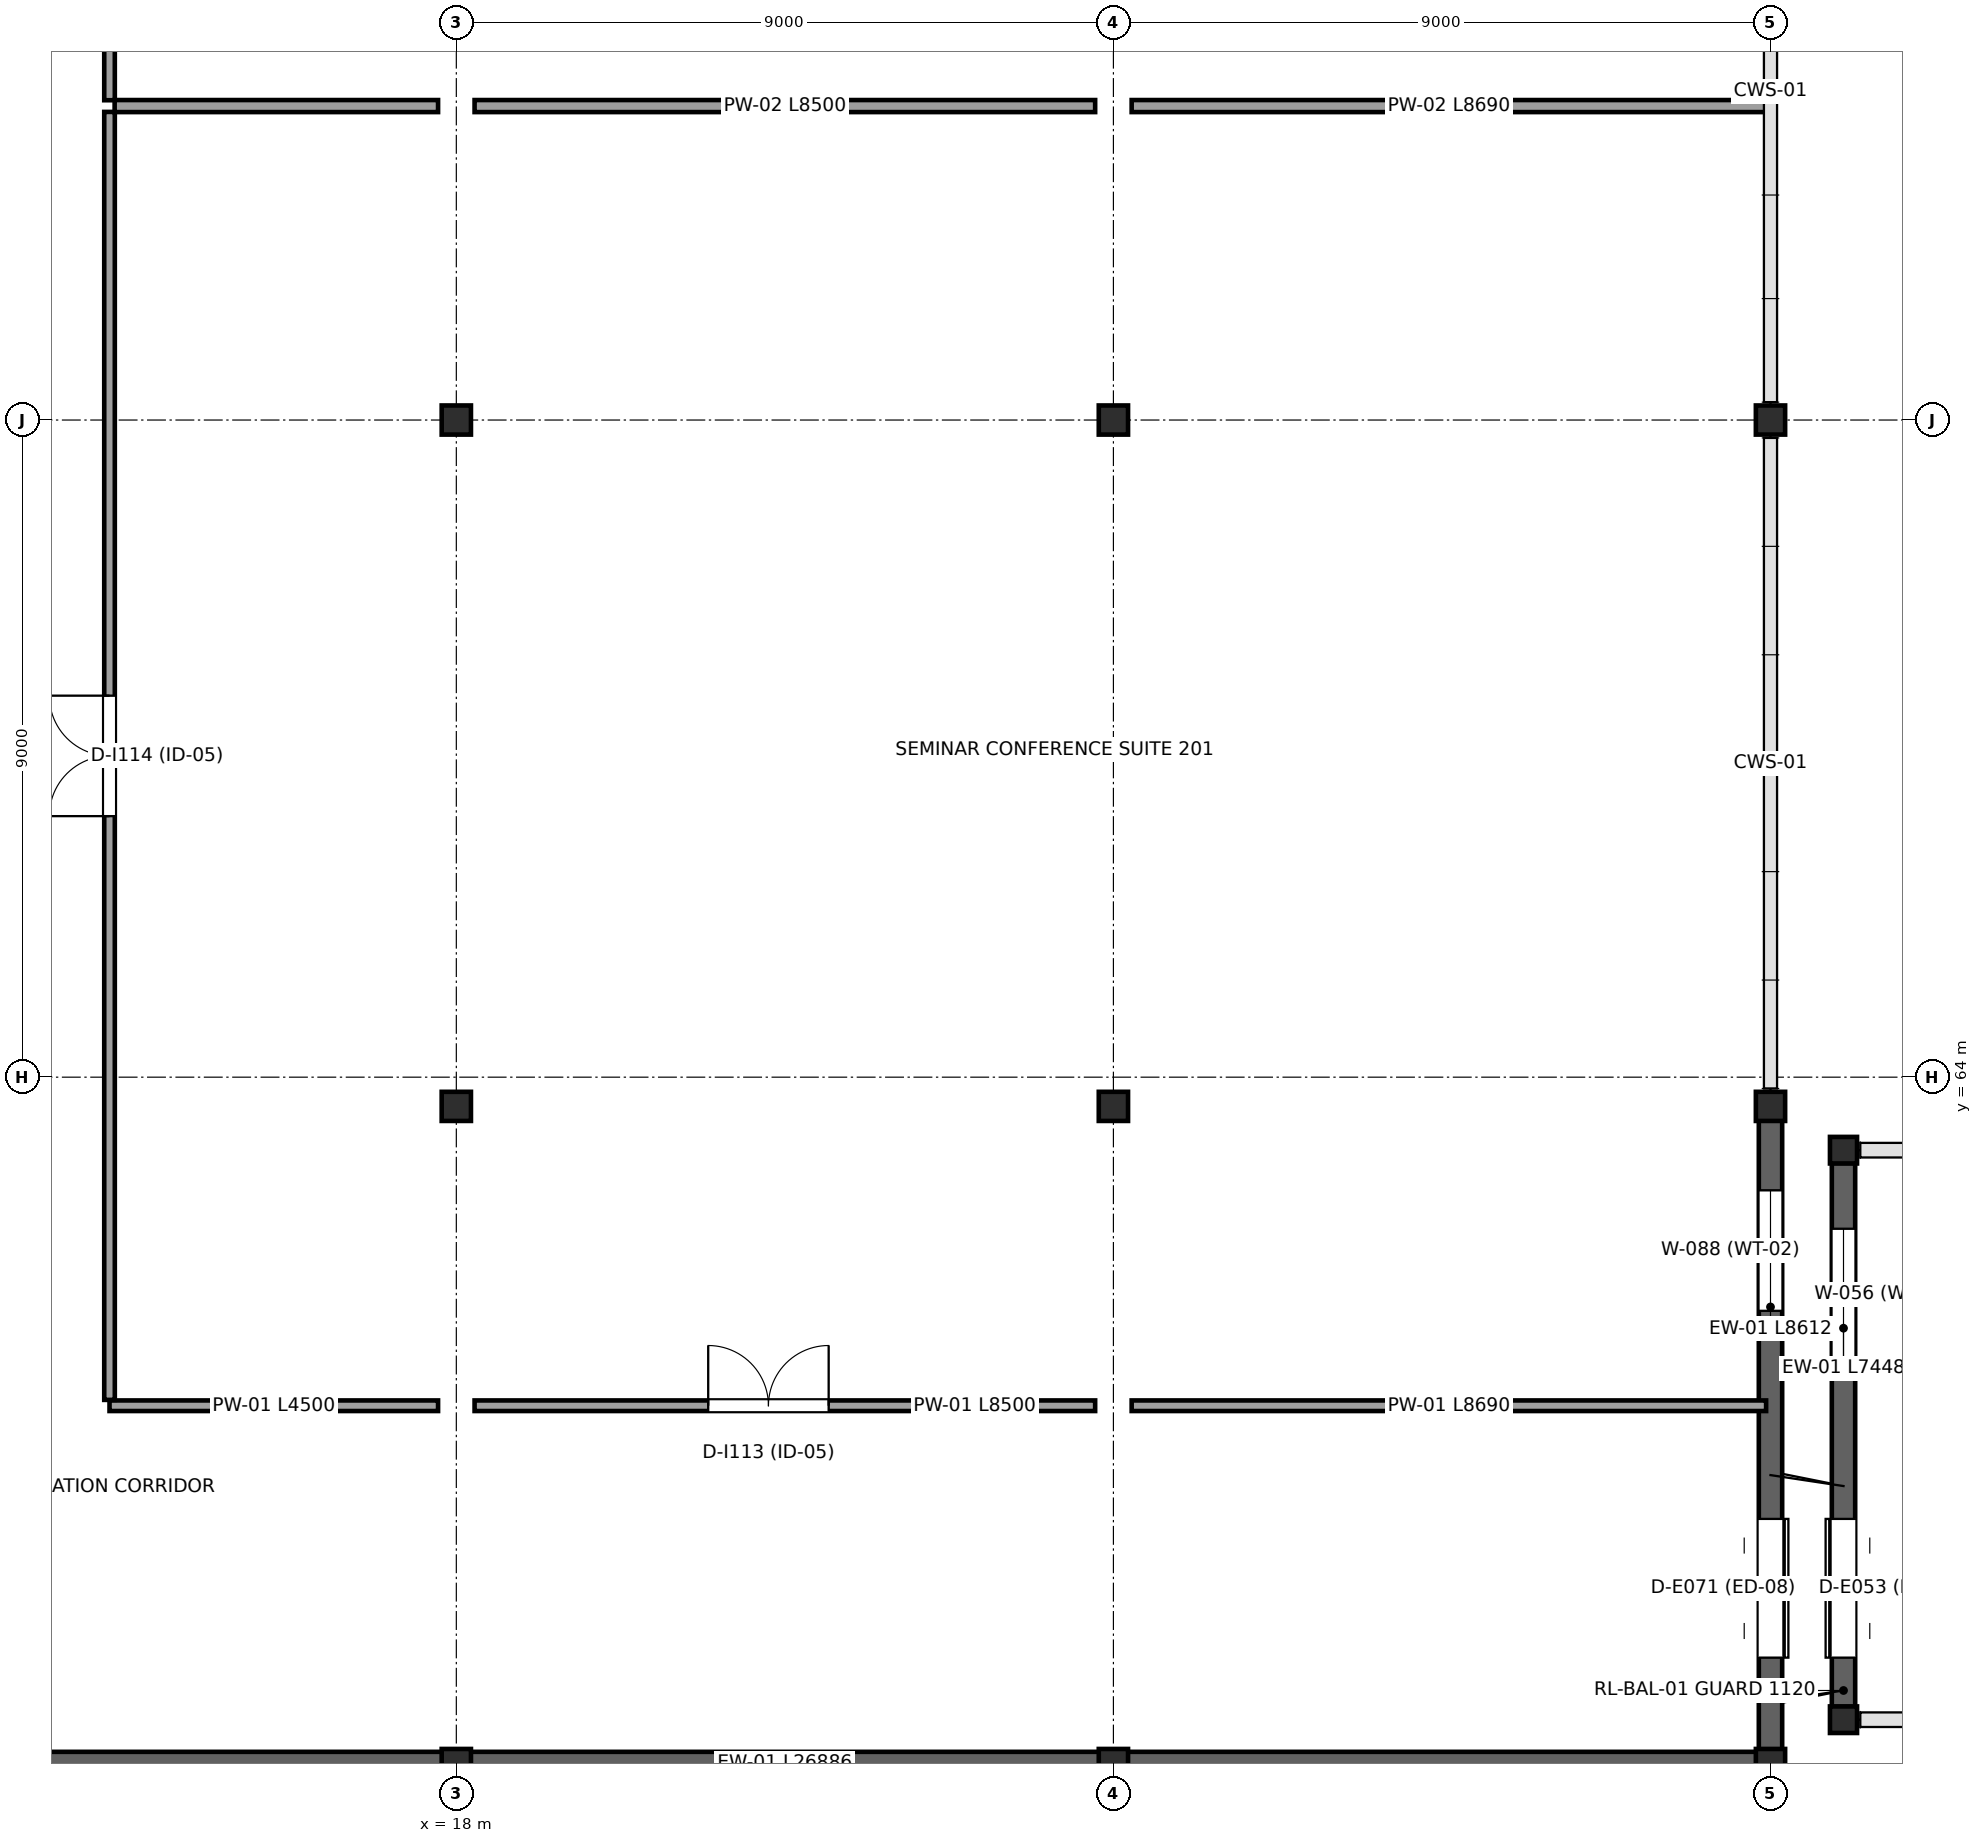
"""IFC4 building model, lengths in metres.
Left out: names, types, materials, properties, quantities, classifications, styles, units other than length and angle.
Written with IfcOpenShell. Run it as: python <this file> out.ifc"""

import sys

from ifc_helpers import new_model, si_unit, direction, frame, frame_2d, origin, origin_2d, place, context, subcontext, project, spatial, rectangle, i_section, extrude, element, fill, save


model = new_model("IFC4")
c1 = context("Model", 3, precision=1e-05, world=origin(), true_north=direction((0.0, 1.0)))
c2 = subcontext(c1, "Body", "Model", "MODEL_VIEW")
j1 = project(units=[si_unit("LENGTHUNIT", "METRE"), si_unit("PLANEANGLEUNIT", "RADIAN")], contexts=[c1])
p1 = place(None, origin())
s1 = spatial("IfcSite", under=j1, at=p1, CompositionType="ELEMENT")
p2 = place(p1, origin())
s2 = spatial("IfcBuilding", under=s1, at=p2, CompositionType="ELEMENT")
p3 = place(p2, frame((0.0, 0.0, 12.0)))
s3 = spatial("IfcBuildingStorey", under=s2, at=p3, CompositionType="ELEMENT", Elevation=12.0)
for number, where, z_axis, x_axis in (
    (1, (37.0, 55.2, 0.0), (0.0, 0.0, 1.0), (1.0, 0.0, 0.0)),
    (2, (37.0, 63.0, 0.0), (0.0, 0.0, 1.0), (1.0, 0.0, 0.0)),
):
    element("IfcColumn", number, at=place(p3, frame(where, z_axis=z_axis, x_axis=x_axis)), inside=s3, PredefinedType="COLUMN", context=c2, shape_type="SweptSolid", body=[
        extrude(i_section(OverallWidth=0.371, OverallDepth=0.364, WebThickness=0.013, FlangeThickness=0.022, at=origin_2d()), origin(), (0.0, 0.0, 1.0), 4.5),
    ])
for number, where, z_axis, x_axis in (
    (3, (18.0, 54.6, 0.0), (0.0, 0.0, 1.0), (1.0, 0.0, 0.0)),
    (4, (18.0, 63.6, 0.0), (0.0, 0.0, 1.0), (1.0, 0.0, 0.0)),
    (5, (18.0, 73.0, 0.0), (0.0, 0.0, 1.0), (1.0, 0.0, 0.0)),
    (6, (27.0, 54.6, 0.0), (0.0, 0.0, 1.0), (1.0, 0.0, 0.0)),
    (7, (27.0, 63.6, 0.0), (0.0, 0.0, 1.0), (1.0, 0.0, 0.0)),
    (8, (27.0, 73.0, 0.0), (0.0, 0.0, 1.0), (1.0, 0.0, 0.0)),
    (9, (36.0, 54.6, 0.0), (0.0, 0.0, 1.0), (1.0, 0.0, 0.0)),
    (10, (36.0, 63.6, 0.0), (0.0, 0.0, 1.0), (1.0, 0.0, 0.0)),
    (11, (36.0, 73.0, 0.0), (0.0, 0.0, 1.0), (1.0, 0.0, 0.0)),
):
    element("IfcColumn", number, at=place(p3, frame(where, z_axis=z_axis, x_axis=x_axis)), inside=s3, PredefinedType="COLUMN", context=c2, shape_type="SweptSolid", body=[
        extrude(i_section(OverallWidth=0.401, OverallDepth=0.399, WebThickness=0.025, FlangeThickness=0.04, at=origin_2d()), origin(), (0.0, 0.0, 1.0), 4.5),
    ])
p4 = place(p3, frame((37.0, 55.376, 0.0), z_axis=(0.0, 0.0, 1.0), x_axis=(0.0, 1.0, 0.0)))
e12 = element("IfcWall", 12, at=p4, inside=s3, PredefinedType="STANDARD", context=c2, shape_type="SweptSolid", body=[
    extrude(rectangle(XDim=7.448, YDim=0.32, at=frame_2d((3.724, 0.0))), origin(), (0.0, 0.0, 1.0), 4.325),
])
p5 = place(p4, frame((0.674, 0.0, 0.0)))
e13 = element("IfcOpeningElement", 13, at=p5, cuts=e12, PredefinedType="OPENING", context=c2, shape_type="SweptSolid", body=[
    extrude(rectangle(XDim=1.9, YDim=2.38, at=frame_2d((0.95, 1.19))), frame((0.0, 0.17, 0.0), z_axis=(0.0, -1.0, 0.0), x_axis=(1.0, 0.0, 0.0)), (0.0, 0.0, 1.0), 0.34),
])
p6 = place(p4, frame((4.748, 0.0, 1.0)))
e14 = element("IfcOpeningElement", 14, at=p6, cuts=e12, PredefinedType="OPENING", context=c2, shape_type="SweptSolid", body=[
    extrude(rectangle(XDim=1.8, YDim=1.95, at=frame_2d((0.9, 0.975))), frame((0.0, 0.17, 0.0), z_axis=(0.0, -1.0, 0.0), x_axis=(1.0, 0.0, 0.0)), (0.0, 0.0, 1.0), 0.34),
])
p7 = place(p3, frame((36.0, 63.406, 0.0), z_axis=(0.0, 0.0, 1.0), x_axis=(0.0, -1.0, 0.0)))
e15 = element("IfcWall", 15, at=p7, inside=s3, PredefinedType="STANDARD", context=c2, shape_type="SweptSolid", body=[
    extrude(rectangle(XDim=8.612, YDim=0.32, at=frame_2d((4.306, 0.0))), origin(), (0.0, 0.0, 1.0), 4.28),
])
p8 = place(p7, frame((5.456, 0.0, 0.0)))
e16 = element("IfcOpeningElement", 16, at=p8, cuts=e15, PredefinedType="OPENING", context=c2, shape_type="SweptSolid", body=[
    extrude(rectangle(XDim=1.9, YDim=2.38, at=frame_2d((0.95, 1.19))), frame((0.0, 0.17, 0.0), z_axis=(0.0, -1.0, 0.0), x_axis=(1.0, 0.0, 0.0)), (0.0, 0.0, 1.0), 0.34),
])
p9 = place(p7, frame((0.956, 0.0, 1.1)))
e17 = element("IfcOpeningElement", 17, at=p9, cuts=e15, PredefinedType="OPENING", context=c2, shape_type="SweptSolid", body=[
    extrude(rectangle(XDim=1.65, YDim=1.8, at=frame_2d((0.825, 0.9))), frame((0.0, 0.17, 0.0), z_axis=(0.0, -1.0, 0.0), x_axis=(1.0, 0.0, 0.0)), (0.0, 0.0, 1.0), 0.34),
])
for number, where, z_axis, x_axis in (
    (18, (17.981, 54.6, 0.0), (0.0, 0.0, 1.0), (-1.0, 0.0, 0.0)),
    (19, (26.981, 54.6, 0.0), (0.0, 0.0, 1.0), (-1.0, 0.0, 0.0)),
    (20, (35.981, 54.6, 0.0), (0.0, 0.0, 1.0), (-1.0, 0.0, 0.0)),
):
    element("IfcWall", number, at=place(p3, frame(where, z_axis=z_axis, x_axis=x_axis)), inside=s3, PredefinedType="STANDARD", context=c2, shape_type="SweptSolid", body=[
        extrude(rectangle(XDim=8.962, YDim=0.32, at=frame_2d((4.481, 0.0))), origin(), (0.0, 0.0, 1.0), 4.28),
    ])
p10 = place(p3, frame((13.25, 59.5, 0.0), z_axis=(0.0, 0.0, 1.0), x_axis=(1.0, 0.0, 0.0)))
e21 = element("IfcWall", 21, at=p10, inside=s3, PredefinedType="PARTITIONING", context=c2, shape_type="SweptSolid", body=[
    extrude(rectangle(XDim=4.5, YDim=0.145, at=frame_2d((2.25, 0.0))), origin(), (0.0, 0.0, 1.0), 3.6),
])
p11 = place(p3, frame((18.25, 59.5, 0.0), z_axis=(0.0, 0.0, 1.0), x_axis=(1.0, 0.0, 0.0)))
e22 = element("IfcWall", 22, at=p11, inside=s3, PredefinedType="PARTITIONING", context=c2, shape_type="SweptSolid", body=[
    extrude(rectangle(XDim=8.5, YDim=0.145, at=frame_2d((4.25, 0.0))), origin(), (0.0, 0.0, 1.0), 3.6),
])
p12 = place(p11, frame((3.2, 0.0, 0.0)))
e23 = element("IfcOpeningElement", 23, at=p12, cuts=e22, PredefinedType="OPENING", context=c2, shape_type="SweptSolid", body=[
    extrude(rectangle(XDim=1.65, YDim=2.25, at=frame_2d((0.825, 1.125))), frame((0.0, 0.083, 0.0), z_axis=(0.0, -1.0, 0.0), x_axis=(1.0, 0.0, 0.0)), (0.0, 0.0, 1.0), 0.165),
])
p13 = place(p3, frame((27.25, 59.5, 0.0), z_axis=(0.0, 0.0, 1.0), x_axis=(1.0, 0.0, 0.0)))
e24 = element("IfcWall", 24, at=p13, inside=s3, PredefinedType="PARTITIONING", context=c2, shape_type="SweptSolid", body=[
    extrude(rectangle(XDim=8.69, YDim=0.145, at=frame_2d((4.345, 0.0))), origin(), (0.0, 0.0, 1.0), 3.6),
])
p14 = place(p3, frame((13.25, 59.58, 0.0), z_axis=(0.0, 0.0, 1.0), x_axis=(0.0, 1.0, 0.0)))
e25 = element("IfcWall", 25, at=p14, inside=s3, PredefinedType="PARTITIONING", context=c2, shape_type="SweptSolid", body=[
    extrude(rectangle(XDim=17.64, YDim=0.145, at=frame_2d((8.82, 0.0))), origin(), (0.0, 0.0, 1.0), 3.6),
])
p15 = place(p14, frame((7.995, 0.0, 0.0)))
e26 = element("IfcOpeningElement", 26, at=p15, cuts=e25, PredefinedType="OPENING", context=c2, shape_type="SweptSolid", body=[
    extrude(rectangle(XDim=1.65, YDim=2.25, at=frame_2d((0.825, 1.125))), frame((0.0, 0.083, 0.0), z_axis=(0.0, -1.0, 0.0), x_axis=(1.0, 0.0, 0.0)), (0.0, 0.0, 1.0), 0.165),
])
p16 = place(p3, frame((13.25, 77.38, 0.0), z_axis=(0.0, 0.0, 1.0), x_axis=(0.0, 1.0, 0.0)))
e27 = element("IfcWall", 27, at=p16, inside=s3, PredefinedType="PARTITIONING", context=c2, shape_type="SweptSolid", body=[
    extrude(rectangle(XDim=22.84, YDim=0.145, at=frame_2d((11.42, 0.0))), origin(), (0.0, 0.0, 1.0), 3.6),
])
p17 = place(p16, frame((10.595, 0.0, 0.0)))
e28 = element("IfcOpeningElement", 28, at=p17, cuts=e27, PredefinedType="OPENING", context=c2, shape_type="SweptSolid", body=[
    extrude(rectangle(XDim=1.65, YDim=2.25, at=frame_2d((0.825, 1.125))), frame((0.0, 0.083, 0.0), z_axis=(0.0, -1.0, 0.0), x_axis=(1.0, 0.0, 0.0)), (0.0, 0.0, 1.0), 0.165),
])
p18 = place(p3, frame((13.32, 77.3, 0.0), z_axis=(0.0, 0.0, 1.0), x_axis=(1.0, 0.0, 0.0)))
e29 = element("IfcWall", 29, at=p18, inside=s3, PredefinedType="PARTITIONING", context=c2, shape_type="SweptSolid", body=[
    extrude(rectangle(XDim=4.43, YDim=0.165, at=frame_2d((2.215, 0.0))), origin(), (0.0, 0.0, 1.0), 3.6),
])
p19 = place(p3, frame((18.25, 77.3, 0.0), z_axis=(0.0, 0.0, 1.0), x_axis=(1.0, 0.0, 0.0)))
e30 = element("IfcWall", 30, at=p19, inside=s3, PredefinedType="PARTITIONING", context=c2, shape_type="SweptSolid", body=[
    extrude(rectangle(XDim=8.5, YDim=0.165, at=frame_2d((4.25, 0.0))), origin(), (0.0, 0.0, 1.0), 3.6),
])
p20 = place(p3, frame((27.25, 77.3, 0.0), z_axis=(0.0, 0.0, 1.0), x_axis=(1.0, 0.0, 0.0)))
e31 = element("IfcWall", 31, at=p20, inside=s3, PredefinedType="PARTITIONING", context=c2, shape_type="SweptSolid", body=[
    extrude(rectangle(XDim=8.69, YDim=0.165, at=frame_2d((4.345, 0.0))), origin(), (0.0, 0.0, 1.0), 3.6),
])
p21 = place(p5, origin())
e32 = element("IfcDoor", 32, at=p21, inside=s3, OperationType="DOUBLE_DOOR_SLIDING", PredefinedType="DOOR", context=c2, shape_type="SweptSolid", body=[
    extrude(rectangle(XDim=1.9, YDim=2.38, at=frame_2d((0.95, 1.19))), frame((0.0, 0.025, 0.0), z_axis=(0.0, -1.0, 0.0), x_axis=(1.0, 0.0, 0.0)), (0.0, 0.0, 1.0), 0.05),
])
fill(e13, e32)
p22 = place(p6, origin())
e33 = element("IfcWindow", 33, at=p22, inside=s3, PartitioningType="SINGLE_PANEL", PredefinedType="WINDOW", context=c2, shape_type="SweptSolid", body=[
    extrude(rectangle(XDim=1.8, YDim=1.95, at=frame_2d((0.9, 0.975))), frame((0.0, 0.03, 0.0), z_axis=(0.0, -1.0, 0.0), x_axis=(1.0, 0.0, 0.0)), (0.0, 0.0, 1.0), 0.06),
])
fill(e14, e33)
p23 = place(p8, origin())
e34 = element("IfcDoor", 34, at=p23, inside=s3, OperationType="DOUBLE_DOOR_SLIDING", PredefinedType="DOOR", context=c2, shape_type="SweptSolid", body=[
    extrude(rectangle(XDim=1.9, YDim=2.38, at=frame_2d((0.95, 1.19))), frame((0.0, 0.025, 0.0), z_axis=(0.0, -1.0, 0.0), x_axis=(1.0, 0.0, 0.0)), (0.0, 0.0, 1.0), 0.05),
])
fill(e16, e34)
p24 = place(p9, origin())
e35 = element("IfcWindow", 35, at=p24, inside=s3, PartitioningType="SINGLE_PANEL", PredefinedType="WINDOW", context=c2, shape_type="SweptSolid", body=[
    extrude(rectangle(XDim=1.65, YDim=1.8, at=frame_2d((0.825, 0.9))), frame((0.0, 0.03, 0.0), z_axis=(0.0, -1.0, 0.0), x_axis=(1.0, 0.0, 0.0)), (0.0, 0.0, 1.0), 0.06),
])
fill(e17, e35)
p25 = place(p12, origin())
e36 = element("IfcDoor", 36, at=p25, inside=s3, OperationType="DOUBLE_DOOR_SINGLE_SWING", PredefinedType="DOOR", context=c2, shape_type="SweptSolid", body=[
    extrude(rectangle(XDim=1.65, YDim=2.25, at=frame_2d((0.825, 1.125))), frame((0.0, 0.025, 0.0), z_axis=(0.0, -1.0, 0.0), x_axis=(1.0, 0.0, 0.0)), (0.0, 0.0, 1.0), 0.05),
])
fill(e23, e36)
p26 = place(p15, origin())
e37 = element("IfcDoor", 37, at=p26, inside=s3, OperationType="DOUBLE_DOOR_SINGLE_SWING", PredefinedType="DOOR", context=c2, shape_type="SweptSolid", body=[
    extrude(rectangle(XDim=1.65, YDim=2.25, at=frame_2d((0.825, 1.125))), frame((0.0, 0.025, 0.0), z_axis=(0.0, -1.0, 0.0), x_axis=(1.0, 0.0, 0.0)), (0.0, 0.0, 1.0), 0.05),
])
fill(e26, e37)
save(model, sys.argv[1])
